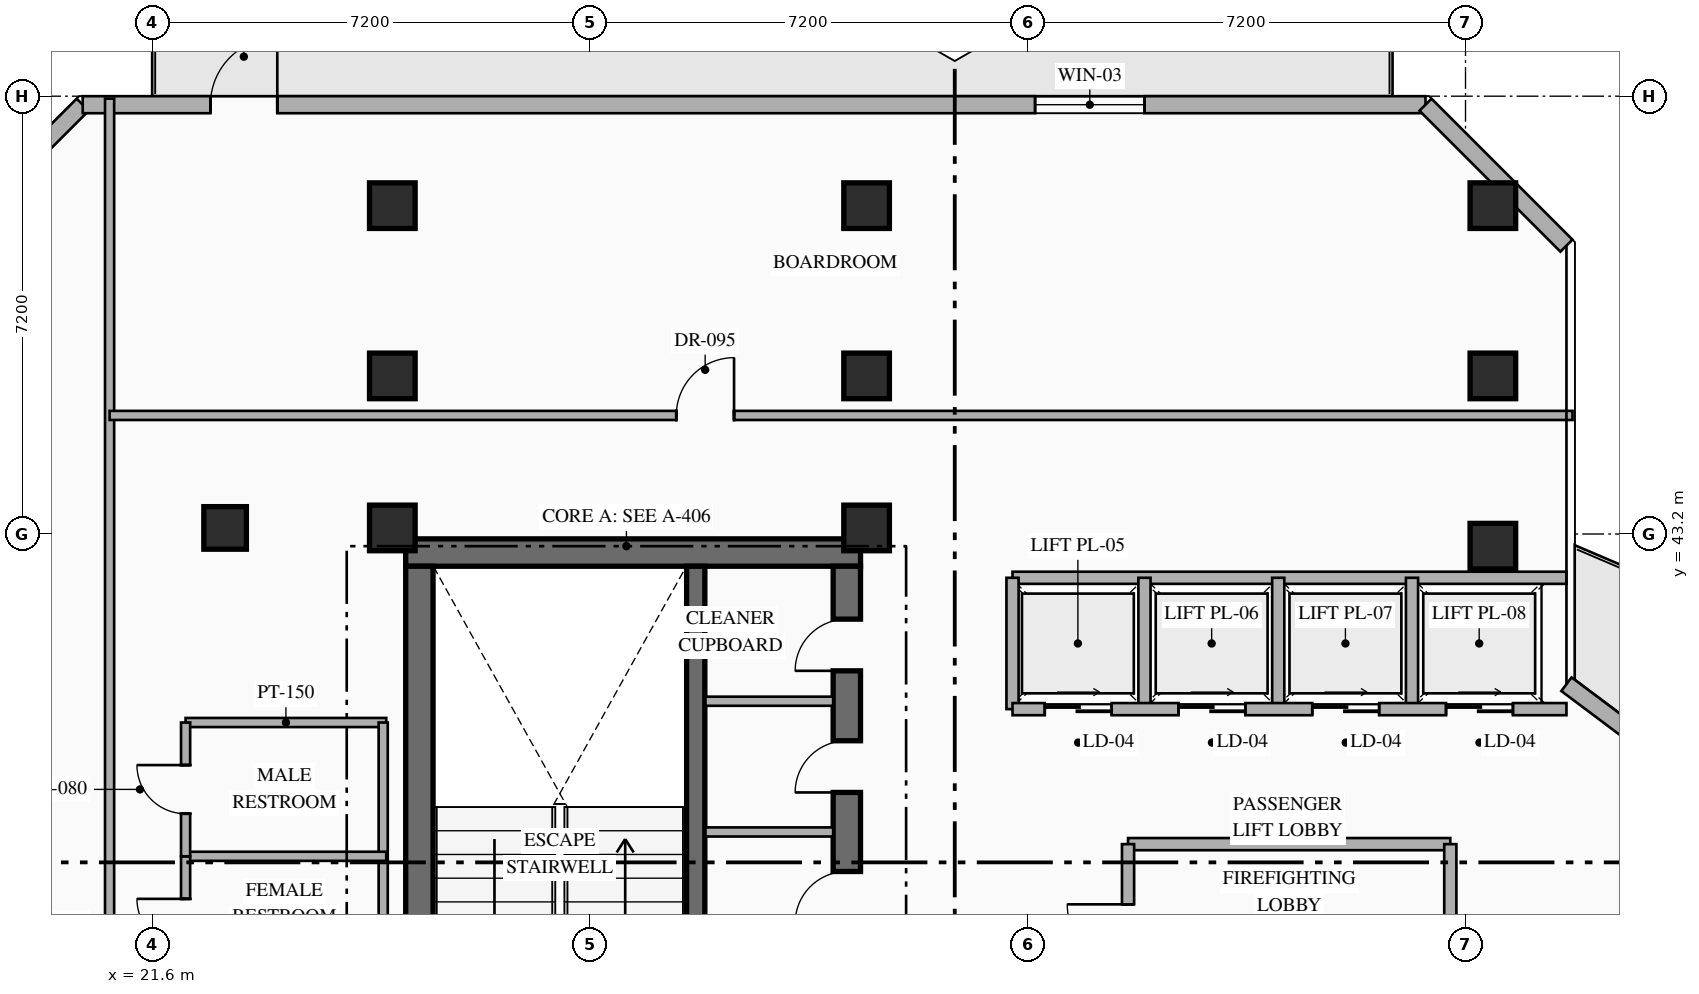
"""IFC4 building model, lengths in metres.
Left out: names, types, materials, properties, quantities, classifications, styles, units other than length and angle.
Written with IfcOpenShell. Run it as: python <this file> out.ifc"""

import sys

from ifc_helpers import new_model, si_unit, direction, frame, frame_2d, origin, origin_2d, place, context, subcontext, project, spatial, rectangle, hollow_rectangle, extrude, element, fill, save


model = new_model("IFC4")
c1 = context("Model", 3, precision=1e-05, world=origin(), true_north=direction((0.0, 1.0)))
c2 = subcontext(c1, "Body", "Model", "MODEL_VIEW")
j1 = project(units=[si_unit("LENGTHUNIT", "METRE"), si_unit("PLANEANGLEUNIT", "RADIAN")], contexts=[c1])
p1 = place(None, origin())
s1 = spatial("IfcSite", under=j1, at=p1, CompositionType="ELEMENT")
p2 = place(p1, origin())
s2 = spatial("IfcBuilding", under=s1, at=p2, CompositionType="ELEMENT")
p3 = place(p2, frame((0.0, 0.0, 205.95)))
s3 = spatial("IfcBuildingStorey", under=s2, at=p3, CompositionType="ELEMENT", Elevation=205.95)
p4 = place(p3, frame((25.77, 42.895, 0.0), z_axis=(0.0, 0.0, 1.0), x_axis=(1.0, 0.0, 0.0)))
e1 = element("IfcWall", 1, at=p4, inside=s3, PredefinedType="SHEAR", context=c2, shape_type="SweptSolid", body=[
    extrude(rectangle(XDim=7.48, YDim=0.45, at=frame_2d((3.74, 0.0))), origin(), (0.0, 0.0, 1.0), 3.6),
])
p5 = place(p3, frame((25.995, 33.19, 0.0), z_axis=(0.0, 0.0, 1.0), x_axis=(0.0, 1.0, 0.0)))
e2 = element("IfcWall", 2, at=p5, inside=s3, PredefinedType="SHEAR", context=c2, shape_type="SweptSolid", body=[
    extrude(rectangle(XDim=9.48, YDim=0.45, at=frame_2d((4.74, 0.0))), origin(), (0.0, 0.0, 1.0), 3.6),
])
p6 = place(p3, frame((33.025, 33.19, 0.0), z_axis=(0.0, 0.0, 1.0), x_axis=(0.0, 1.0, 0.0)))
e3 = element("IfcWall", 3, at=p6, inside=s3, PredefinedType="SHEAR", context=c2, shape_type="SweptSolid", body=[
    extrude(rectangle(XDim=9.48, YDim=0.45, at=frame_2d((4.74, 0.0))), origin(), (0.0, 0.0, 1.0), 3.6),
])
p7 = place(p6, frame((3.61, 0.0, 0.0)))
e4 = element("IfcOpeningElement", 4, at=p7, cuts=e3, PredefinedType="OPENING", context=c2, shape_type="SweptSolid", body=[
    extrude(rectangle(XDim=0.85, YDim=2.08, at=frame_2d((0.425, 1.04))), frame((0.0, 0.235, 0.0), z_axis=(0.0, -1.0, 0.0), x_axis=(1.0, 0.0, 0.0)), (0.0, 0.0, 1.0), 0.47),
])
p8 = place(p6, frame((5.76, 0.0, 0.0)))
e5 = element("IfcOpeningElement", 5, at=p8, cuts=e3, PredefinedType="OPENING", context=c2, shape_type="SweptSolid", body=[
    extrude(rectangle(XDim=0.85, YDim=2.08, at=frame_2d((0.425, 1.04))), frame((0.0, 0.235, 0.0), z_axis=(0.0, -1.0, 0.0), x_axis=(1.0, 0.0, 0.0)), (0.0, 0.0, 1.0), 0.47),
])
p9 = place(p6, frame((7.76, 0.0, 0.0)))
e6 = element("IfcOpeningElement", 6, at=p9, cuts=e3, PredefinedType="OPENING", context=c2, shape_type="SweptSolid", body=[
    extrude(rectangle(XDim=0.85, YDim=2.08, at=frame_2d((0.425, 1.04))), frame((0.0, 0.235, 0.0), z_axis=(0.0, -1.0, 0.0), x_axis=(1.0, 0.0, 0.0)), (0.0, 0.0, 1.0), 0.47),
])
p10 = place(p3, frame((30.54, 33.19, 0.0), z_axis=(0.0, 0.0, 1.0), x_axis=(0.0, 1.0, 0.0)))
e7 = element("IfcWall", 7, at=p10, inside=s3, PredefinedType="SHEAR", context=c2, shape_type="SweptSolid", body=[
    extrude(rectangle(XDim=9.48, YDim=0.3, at=frame_2d((4.74, 0.0))), origin(), (0.0, 0.0, 1.0), 3.6),
])
for number, where, z_axis, x_axis in (
    (8, (25.55, 43.3, 0.0), (0.0, 0.0, 1.0), (1.0, 0.0, 0.0)),
    (9, (33.35, 43.3, 0.0), (0.0, 0.0, 1.0), (1.0, 0.0, 0.0)),
    (10, (43.65, 43.0, 0.0), (0.0, 0.0, 1.0), (1.0, 0.0, 0.0)),
    (11, (25.55, 45.8, 0.0), (0.0, 0.0, 1.0), (1.0, 0.0, 0.0)),
    (12, (33.35, 45.8, 0.0), (0.0, 0.0, 1.0), (1.0, 0.0, 0.0)),
    (13, (43.65, 45.8, 0.0), (0.0, 0.0, 1.0), (1.0, 0.0, 0.0)),
    (14, (25.55, 48.6, 0.0), (0.0, 0.0, 1.0), (1.0, 0.0, 0.0)),
    (15, (33.35, 48.6, 0.0), (0.0, 0.0, 1.0), (1.0, 0.0, 0.0)),
    (16, (43.65, 48.6, 0.0), (0.0, 0.0, 1.0), (1.0, 0.0, 0.0)),
):
    element("IfcColumn", number, at=place(p3, frame(where, z_axis=z_axis, x_axis=x_axis)), inside=s3, PredefinedType="COLUMN", context=c2, shape_type="SweptSolid", body=[
        extrude(hollow_rectangle(XDim=0.75, YDim=0.75, WallThickness=0.028, at=origin_2d()), origin(), (0.0, 0.0, 1.0), 3.6),
    ])
p11 = place(p3, frame((22.8, 43.3, 0.0), z_axis=(0.0, 0.0, 1.0), x_axis=(1.0, 0.0, 0.0)))
e17 = element("IfcColumn", 17, at=p11, inside=s3, PredefinedType="COLUMN", context=c2, shape_type="SweptSolid", body=[
    extrude(hollow_rectangle(XDim=0.7, YDim=0.7, WallThickness=0.028, at=origin_2d()), origin(), (0.0, 0.0, 1.0), 3.6),
])
p12 = place(p3, frame((44.86, 40.73, 0.0), z_axis=(0.0, 0.0, 1.0), x_axis=(0.800007624502, -0.599989833863, 0.0)))
e18 = element("IfcWall", 18, at=p12, inside=s3, PredefinedType="STANDARD", context=c2, shape_type="SweptSolid", body=[
    extrude(rectangle(XDim=19.212, YDim=0.28, at=frame_2d((9.606, 0.0))), origin(), (0.0, 0.0, 1.0), 3.35),
])
p13 = place(p12, frame((1.755, 0.0, 0.0)))
e19 = element("IfcOpeningElement", 19, at=p13, cuts=e18, PredefinedType="OPENING", context=c2, shape_type="SweptSolid", body=[
    extrude(rectangle(XDim=1.1, YDim=2.2, at=frame_2d((0.55, 1.1))), frame((0.0, 0.15, 0.0), z_axis=(0.0, -1.0, 0.0), x_axis=(1.0, 0.0, 0.0)), (0.0, 0.0, 1.0), 0.3),
])
p14 = place(p12, frame((13.509, 0.0, 0.85)))
e20 = element("IfcOpeningElement", 20, at=p14, cuts=e18, PredefinedType="OPENING", context=c2, shape_type="SweptSolid", body=[
    extrude(rectangle(XDim=1.8, YDim=2.1, at=frame_2d((0.9, 1.05))), frame((0.0, 0.15, 0.0), z_axis=(0.0, -1.0, 0.0), x_axis=(1.0, 0.0, 0.0)), (0.0, 0.0, 1.0), 0.3),
])
p15 = place(p3, frame((18.14, 47.942, 0.0), z_axis=(0.0, 0.0, 1.0), x_axis=(0.707106781187, 0.707106781187, 0.0)))
e21 = element("IfcWall", 21, at=p15, inside=s3, PredefinedType="STANDARD", context=c2, shape_type="SweptSolid", body=[
    extrude(rectangle(XDim=3.278, YDim=0.28, at=frame_2d((1.639, 0.0))), origin(), (0.0, 0.0, 1.0), 3.35),
])
p16 = place(p3, frame((20.458, 50.26, 0.0), z_axis=(0.0, 0.0, 1.0), x_axis=(1.0, 0.0, 0.0)))
e22 = element("IfcWall", 22, at=p16, inside=s3, PredefinedType="STANDARD", context=c2, shape_type="SweptSolid", body=[
    extrude(rectangle(XDim=22.084, YDim=0.28, at=frame_2d((11.042, 0.0))), origin(), (0.0, 0.0, 1.0), 3.35),
])
p17 = place(p16, frame((2.1, 0.0, 0.0)))
e23 = element("IfcOpeningElement", 23, at=p17, cuts=e22, PredefinedType="OPENING", context=c2, shape_type="SweptSolid", body=[
    extrude(rectangle(XDim=1.1, YDim=2.2, at=frame_2d((0.55, 1.1))), frame((0.0, 0.15, 0.0), z_axis=(0.0, -1.0, 0.0), x_axis=(1.0, 0.0, 0.0)), (0.0, 0.0, 1.0), 0.3),
])
p18 = place(p16, frame((15.663, 0.0, 0.85)))
e24 = element("IfcOpeningElement", 24, at=p18, cuts=e22, PredefinedType="OPENING", context=c2, shape_type="SweptSolid", body=[
    extrude(rectangle(XDim=1.8, YDim=2.1, at=frame_2d((0.9, 1.05))), frame((0.0, 0.15, 0.0), z_axis=(0.0, -1.0, 0.0), x_axis=(1.0, 0.0, 0.0)), (0.0, 0.0, 1.0), 0.3),
])
p19 = place(p3, frame((42.542, 50.26, 0.0), z_axis=(0.0, 0.0, 1.0), x_axis=(0.707106781187, -0.707106781187, 0.0)))
e25 = element("IfcWall", 25, at=p19, inside=s3, PredefinedType="STANDARD", context=c2, shape_type="SweptSolid", body=[
    extrude(rectangle(XDim=3.278, YDim=0.28, at=frame_2d((1.639, 0.0))), origin(), (0.0, 0.0, 1.0), 3.35),
])
for number, where, z_axis, x_axis in (
    (26, (30.7, 38.3, 0.0), (0.0, 0.0, 1.0), (1.0, 0.0, 0.0)),
    (27, (30.7, 40.45, 0.0), (0.0, 0.0, 1.0), (1.0, 0.0, 0.0)),
):
    element("IfcWall", number, at=place(p3, frame(where, z_axis=z_axis, x_axis=x_axis)), inside=s3, PredefinedType="PARTITIONING", context=c2, shape_type="SweptSolid", body=[
        extrude(rectangle(XDim=2.1, YDim=0.15, at=frame_2d((1.05, 0.0))), origin(), (0.0, 0.0, 1.0), 3.35),
    ])
p20 = place(p3, frame((37.65, 38.1, 0.0), z_axis=(0.0, 0.0, 1.0), x_axis=(1.0, 0.0, 0.0)))
e28 = element("IfcWall", 28, at=p20, inside=s3, PredefinedType="STANDARD", context=c2, shape_type="SweptSolid", body=[
    extrude(rectangle(XDim=5.3, YDim=0.2, at=frame_2d((2.65, 0.0))), origin(), (0.0, 0.0, 1.0), 3.35),
])
p21 = place(p3, frame((42.95, 35.12, 0.0), z_axis=(0.0, 0.0, 1.0), x_axis=(0.0, 1.0, 0.0)))
e29 = element("IfcWall", 29, at=p21, inside=s3, PredefinedType="STANDARD", context=c2, shape_type="SweptSolid", body=[
    extrude(rectangle(XDim=2.98, YDim=0.2, at=frame_2d((1.49, 0.0))), origin(), (0.0, 0.0, 1.0), 3.35),
])
p22 = place(p3, frame((37.65, 35.12, 0.0), z_axis=(0.0, 0.0, 1.0), x_axis=(0.0, 1.0, 0.0)))
e30 = element("IfcWall", 30, at=p22, inside=s3, PredefinedType="STANDARD", context=c2, shape_type="SweptSolid", body=[
    extrude(rectangle(XDim=2.98, YDim=0.2, at=frame_2d((1.49, 0.0))), origin(), (0.0, 0.0, 1.0), 3.35),
])
p23 = place(p22, frame((0.99, 0.0, 0.0)))
e31 = element("IfcOpeningElement", 31, at=p23, cuts=e30, PredefinedType="OPENING", context=c2, shape_type="SweptSolid", body=[
    extrude(rectangle(XDim=1.0, YDim=2.2, at=frame_2d((0.5, 1.1))), frame((0.0, 0.11, 0.0), z_axis=(0.0, -1.0, 0.0), x_axis=(1.0, 0.0, 0.0)), (0.0, 0.0, 1.0), 0.22),
])
p24 = place(p3, frame((35.75, 42.48, 0.0), z_axis=(0.0, 0.0, 1.0), x_axis=(1.0, 0.0, 0.0)))
e32 = element("IfcWall", 32, at=p24, inside=s3, PredefinedType="STANDARD", context=c2, shape_type="SweptSolid", body=[
    extrude(rectangle(XDim=9.11, YDim=0.2, at=frame_2d((4.555, 0.0))), origin(), (0.0, 0.0, 1.0), 3.35),
])
for number, where, z_axis, x_axis in (
    (33, (35.75, 40.32, 0.0), (0.0, 0.0, 1.0), (0.0, 1.0, 0.0)),
    (34, (37.92, 40.32, 0.0), (0.0, 0.0, 1.0), (0.0, 1.0, 0.0)),
    (35, (40.12, 40.32, 0.0), (0.0, 0.0, 1.0), (0.0, 1.0, 0.0)),
    (36, (42.32, 40.32, 0.0), (0.0, 0.0, 1.0), (0.0, 1.0, 0.0)),
):
    element("IfcWall", number, at=place(p3, frame(where, z_axis=z_axis, x_axis=x_axis)), inside=s3, PredefinedType="STANDARD", context=c2, shape_type="SweptSolid", body=[
        extrude(rectangle(XDim=2.16, YDim=0.2, at=frame_2d((1.08, 0.0))), origin(), (0.0, 0.0, 1.0), 3.35),
    ])
p25 = place(p3, frame((35.75, 40.32, 0.0), z_axis=(0.0, 0.0, 1.0), x_axis=(1.0, 0.0, 0.0)))
e37 = element("IfcWall", 37, at=p25, inside=s3, PredefinedType="STANDARD", context=c2, shape_type="SweptSolid", body=[
    extrude(rectangle(XDim=9.11, YDim=0.2, at=frame_2d((4.555, 0.0))), origin(), (0.0, 0.0, 1.0), 3.35),
])
p26 = place(p25, frame((0.53, 0.0, 0.0)))
e38 = element("IfcOpeningElement", 38, at=p26, cuts=e37, PredefinedType="OPENING", context=c2, shape_type="SweptSolid", body=[
    extrude(rectangle(XDim=1.1, YDim=2.18, at=frame_2d((0.55, 1.09))), frame((0.0, 0.11, 0.0), z_axis=(0.0, -1.0, 0.0), x_axis=(1.0, 0.0, 0.0)), (0.0, 0.0, 1.0), 0.22),
])
p27 = place(p25, frame((2.73, 0.0, 0.0)))
e39 = element("IfcOpeningElement", 39, at=p27, cuts=e37, PredefinedType="OPENING", context=c2, shape_type="SweptSolid", body=[
    extrude(rectangle(XDim=1.1, YDim=2.18, at=frame_2d((0.55, 1.09))), frame((0.0, 0.11, 0.0), z_axis=(0.0, -1.0, 0.0), x_axis=(1.0, 0.0, 0.0)), (0.0, 0.0, 1.0), 0.22),
])
p28 = place(p25, frame((4.93, 0.0, 0.0)))
e40 = element("IfcOpeningElement", 40, at=p28, cuts=e37, PredefinedType="OPENING", context=c2, shape_type="SweptSolid", body=[
    extrude(rectangle(XDim=1.1, YDim=2.18, at=frame_2d((0.55, 1.09))), frame((0.0, 0.11, 0.0), z_axis=(0.0, -1.0, 0.0), x_axis=(1.0, 0.0, 0.0)), (0.0, 0.0, 1.0), 0.22),
])
p29 = place(p25, frame((7.13, 0.0, 0.0)))
e41 = element("IfcOpeningElement", 41, at=p29, cuts=e37, PredefinedType="OPENING", context=c2, shape_type="SweptSolid", body=[
    extrude(rectangle(XDim=1.1, YDim=2.18, at=frame_2d((0.55, 1.09))), frame((0.0, 0.11, 0.0), z_axis=(0.0, -1.0, 0.0), x_axis=(1.0, 0.0, 0.0)), (0.0, 0.0, 1.0), 0.22),
])
p30 = place(p3, frame((22.15, 40.1, 0.0), z_axis=(0.0, 0.0, 1.0), x_axis=(1.0, 0.0, 0.0)))
e42 = element("IfcWall", 42, at=p30, inside=s3, PredefinedType="PARTITIONING", context=c2, shape_type="SweptSolid", body=[
    extrude(rectangle(XDim=3.3, YDim=0.15, at=frame_2d((1.65, 0.0))), origin(), (0.0, 0.0, 1.0), 3.35),
])
p31 = place(p3, frame((25.4, 33.5, 0.0), z_axis=(0.0, 0.0, 1.0), x_axis=(0.0, 1.0, 0.0)))
e43 = element("IfcWall", 43, at=p31, inside=s3, PredefinedType="PARTITIONING", context=c2, shape_type="SweptSolid", body=[
    extrude(rectangle(XDim=6.6, YDim=0.15, at=frame_2d((3.3, 0.0))), origin(), (0.0, 0.0, 1.0), 3.35),
])
p32 = place(p3, frame((22.15, 37.9, 0.0), z_axis=(0.0, 0.0, 1.0), x_axis=(1.0, 0.0, 0.0)))
e44 = element("IfcWall", 44, at=p32, inside=s3, PredefinedType="PARTITIONING", context=c2, shape_type="SweptSolid", body=[
    extrude(rectangle(XDim=3.3, YDim=0.15, at=frame_2d((1.65, 0.0))), origin(), (0.0, 0.0, 1.0), 3.35),
])
p33 = place(p3, frame((22.15, 35.7, 0.0), z_axis=(0.0, 0.0, 1.0), x_axis=(0.0, 1.0, 0.0)))
e45 = element("IfcWall", 45, at=p33, inside=s3, PredefinedType="PARTITIONING", context=c2, shape_type="SweptSolid", body=[
    extrude(rectangle(XDim=2.2, YDim=0.15, at=frame_2d((1.1, 0.0))), origin(), (0.0, 0.0, 1.0), 3.35),
])
p34 = place(p33, frame((0.7, 0.0, 0.0)))
e46 = element("IfcOpeningElement", 46, at=p34, cuts=e45, PredefinedType="OPENING", context=c2, shape_type="SweptSolid", body=[
    extrude(rectangle(XDim=0.8, YDim=2.06, at=frame_2d((0.4, 1.03))), frame((0.0, 0.085, 0.0), z_axis=(0.0, -1.0, 0.0), x_axis=(1.0, 0.0, 0.0)), (0.0, 0.0, 1.0), 0.17),
])
p35 = place(p3, frame((22.15, 37.9, 0.0), z_axis=(0.0, 0.0, 1.0), x_axis=(0.0, 1.0, 0.0)))
e47 = element("IfcWall", 47, at=p35, inside=s3, PredefinedType="PARTITIONING", context=c2, shape_type="SweptSolid", body=[
    extrude(rectangle(XDim=2.2, YDim=0.15, at=frame_2d((1.1, 0.0))), origin(), (0.0, 0.0, 1.0), 3.35),
])
p36 = place(p35, frame((0.7, 0.0, 0.0)))
e48 = element("IfcOpeningElement", 48, at=p36, cuts=e47, PredefinedType="OPENING", context=c2, shape_type="SweptSolid", body=[
    extrude(rectangle(XDim=0.8, YDim=2.06, at=frame_2d((0.4, 1.03))), frame((0.0, 0.085, 0.0), z_axis=(0.0, -1.0, 0.0), x_axis=(1.0, 0.0, 0.0)), (0.0, 0.0, 1.0), 0.17),
])
p37 = place(p3, frame((20.9, 23.44, 0.0), z_axis=(0.0, 0.0, 1.0), x_axis=(0.0, 1.0, 0.0)))
e49 = element("IfcWall", 49, at=p37, inside=s3, PredefinedType="PARTITIONING", context=c2, shape_type="SweptSolid", body=[
    extrude(rectangle(XDim=26.92, YDim=0.15, at=frame_2d((13.46, 0.0))), origin(), (0.0, 0.0, 1.0), 3.35),
])
p38 = place(p37, frame((7.943, 0.0, 0.0)))
e50 = element("IfcOpeningElement", 50, at=p38, cuts=e49, PredefinedType="OPENING", context=c2, shape_type="SweptSolid", body=[
    extrude(rectangle(XDim=0.95, YDim=2.15, at=frame_2d((0.475, 1.075))), frame((0.0, 0.085, 0.0), z_axis=(0.0, -1.0, 0.0), x_axis=(1.0, 0.0, 0.0)), (0.0, 0.0, 1.0), 0.17),
])
p39 = place(p3, frame((20.9, 45.15, 0.0), z_axis=(0.0, 0.0, 1.0), x_axis=(1.0, 0.0, 0.0)))
e51 = element("IfcWall", 51, at=p39, inside=s3, PredefinedType="PARTITIONING", context=c2, shape_type="SweptSolid", body=[
    extrude(rectangle(XDim=24.06, YDim=0.15, at=frame_2d((12.03, 0.0))), origin(), (0.0, 0.0, 1.0), 3.35),
])
p40 = place(p39, frame((9.32, 0.0, 0.0)))
e52 = element("IfcOpeningElement", 52, at=p40, cuts=e51, PredefinedType="OPENING", context=c2, shape_type="SweptSolid", body=[
    extrude(rectangle(XDim=0.95, YDim=2.15, at=frame_2d((0.475, 1.075))), frame((0.0, 0.085, 0.0), z_axis=(0.0, -1.0, 0.0), x_axis=(1.0, 0.0, 0.0)), (0.0, 0.0, 1.0), 0.17),
])
p41 = place(p3, frame((43.48, 31.773, 0.0), z_axis=(0.0, 0.0, 1.0), x_axis=(0.599971041729, 0.800021717885, 0.0)))
e53 = element("IfcWall", 53, at=p41, inside=s3, PredefinedType="PARTITIONING", context=c2, shape_type="SweptSolid", body=[
    extrude(rectangle(XDim=8.094, YDim=0.15, at=frame_2d((4.047, 0.0))), origin(), (0.0, 0.0, 1.0), 3.35),
])
p42 = place(p17, origin())
e54 = element("IfcDoor", 54, at=p42, inside=s3, OperationType="SINGLE_SWING_RIGHT", PredefinedType="DOOR", context=c2, shape_type="SweptSolid", body=[
    extrude(rectangle(XDim=1.1, YDim=2.2, at=frame_2d((0.55, 1.1))), frame((0.0, 0.025, 0.0), z_axis=(0.0, -1.0, 0.0), x_axis=(1.0, 0.0, 0.0)), (0.0, 0.0, 1.0), 0.05),
])
fill(e23, e54)
p43 = place(p18, origin())
e55 = element("IfcWindow", 55, at=p43, inside=s3, PartitioningType="SINGLE_PANEL", PredefinedType="WINDOW", context=c2, shape_type="SweptSolid", body=[
    extrude(rectangle(XDim=1.8, YDim=2.1, at=frame_2d((0.9, 1.05))), frame((0.0, 0.03, 0.0), z_axis=(0.0, -1.0, 0.0), x_axis=(1.0, 0.0, 0.0)), (0.0, 0.0, 1.0), 0.06),
])
fill(e24, e55)
p44 = place(p7, origin())
e56 = element("IfcDoor", 56, at=p44, inside=s3, OperationType="SINGLE_SWING_LEFT", PredefinedType="DOOR", context=c2, shape_type="SweptSolid", body=[
    extrude(rectangle(XDim=0.85, YDim=2.08, at=frame_2d((0.425, 1.04))), frame((0.0, 0.025, 0.0), z_axis=(0.0, -1.0, 0.0), x_axis=(1.0, 0.0, 0.0)), (0.0, 0.0, 1.0), 0.05),
])
fill(e4, e56)
p45 = place(p8, origin())
e57 = element("IfcDoor", 57, at=p45, inside=s3, OperationType="SINGLE_SWING_LEFT", PredefinedType="DOOR", context=c2, shape_type="SweptSolid", body=[
    extrude(rectangle(XDim=0.85, YDim=2.08, at=frame_2d((0.425, 1.04))), frame((0.0, 0.025, 0.0), z_axis=(0.0, -1.0, 0.0), x_axis=(1.0, 0.0, 0.0)), (0.0, 0.0, 1.0), 0.05),
])
fill(e5, e57)
p46 = place(p9, origin())
e58 = element("IfcDoor", 58, at=p46, inside=s3, OperationType="SINGLE_SWING_LEFT", PredefinedType="DOOR", context=c2, shape_type="SweptSolid", body=[
    extrude(rectangle(XDim=0.85, YDim=2.08, at=frame_2d((0.425, 1.04))), frame((0.0, 0.025, 0.0), z_axis=(0.0, -1.0, 0.0), x_axis=(1.0, 0.0, 0.0)), (0.0, 0.0, 1.0), 0.05),
])
fill(e6, e58)
p47 = place(p23, origin())
e59 = element("IfcDoor", 59, at=p47, inside=s3, OperationType="SINGLE_SWING_RIGHT", PredefinedType="DOOR", context=c2, shape_type="SweptSolid", body=[
    extrude(rectangle(XDim=1.0, YDim=2.2, at=frame_2d((0.5, 1.1))), frame((0.0, 0.025, 0.0), z_axis=(0.0, -1.0, 0.0), x_axis=(1.0, 0.0, 0.0)), (0.0, 0.0, 1.0), 0.05),
])
fill(e31, e59)
p48 = place(p26, origin())
e60 = element("IfcDoor", 60, at=p48, inside=s3, OperationType="SLIDING_TO_RIGHT", PredefinedType="USERDEFINED", context=c2, shape_type="SweptSolid", body=[
    extrude(rectangle(XDim=1.1, YDim=2.18, at=frame_2d((0.55, 1.09))), frame((0.0, 0.025, 0.0), z_axis=(0.0, -1.0, 0.0), x_axis=(1.0, 0.0, 0.0)), (0.0, 0.0, 1.0), 0.05),
])
fill(e38, e60)
p49 = place(p27, origin())
e61 = element("IfcDoor", 61, at=p49, inside=s3, OperationType="SLIDING_TO_RIGHT", PredefinedType="USERDEFINED", context=c2, shape_type="SweptSolid", body=[
    extrude(rectangle(XDim=1.1, YDim=2.18, at=frame_2d((0.55, 1.09))), frame((0.0, 0.025, 0.0), z_axis=(0.0, -1.0, 0.0), x_axis=(1.0, 0.0, 0.0)), (0.0, 0.0, 1.0), 0.05),
])
fill(e39, e61)
p50 = place(p28, origin())
e62 = element("IfcDoor", 62, at=p50, inside=s3, OperationType="SLIDING_TO_RIGHT", PredefinedType="USERDEFINED", context=c2, shape_type="SweptSolid", body=[
    extrude(rectangle(XDim=1.1, YDim=2.18, at=frame_2d((0.55, 1.09))), frame((0.0, 0.025, 0.0), z_axis=(0.0, -1.0, 0.0), x_axis=(1.0, 0.0, 0.0)), (0.0, 0.0, 1.0), 0.05),
])
fill(e40, e62)
p51 = place(p29, origin())
e63 = element("IfcDoor", 63, at=p51, inside=s3, OperationType="SLIDING_TO_RIGHT", PredefinedType="USERDEFINED", context=c2, shape_type="SweptSolid", body=[
    extrude(rectangle(XDim=1.1, YDim=2.18, at=frame_2d((0.55, 1.09))), frame((0.0, 0.025, 0.0), z_axis=(0.0, -1.0, 0.0), x_axis=(1.0, 0.0, 0.0)), (0.0, 0.0, 1.0), 0.05),
])
fill(e41, e63)
p52 = place(p34, origin())
e64 = element("IfcDoor", 64, at=p52, inside=s3, OperationType="SINGLE_SWING_RIGHT", PredefinedType="DOOR", context=c2, shape_type="SweptSolid", body=[
    extrude(rectangle(XDim=0.8, YDim=2.06, at=frame_2d((0.4, 1.03))), frame((0.0, 0.025, 0.0), z_axis=(0.0, -1.0, 0.0), x_axis=(1.0, 0.0, 0.0)), (0.0, 0.0, 1.0), 0.05),
])
fill(e46, e64)
p53 = place(p36, origin())
e65 = element("IfcDoor", 65, at=p53, inside=s3, OperationType="SINGLE_SWING_RIGHT", PredefinedType="DOOR", context=c2, shape_type="SweptSolid", body=[
    extrude(rectangle(XDim=0.8, YDim=2.06, at=frame_2d((0.4, 1.03))), frame((0.0, 0.025, 0.0), z_axis=(0.0, -1.0, 0.0), x_axis=(1.0, 0.0, 0.0)), (0.0, 0.0, 1.0), 0.05),
])
fill(e48, e65)
p54 = place(p40, origin())
e66 = element("IfcDoor", 66, at=p54, inside=s3, OperationType="SINGLE_SWING_RIGHT", PredefinedType="DOOR", context=c2, shape_type="SweptSolid", body=[
    extrude(rectangle(XDim=0.95, YDim=2.15, at=frame_2d((0.475, 1.075))), frame((0.0, 0.025, 0.0), z_axis=(0.0, -1.0, 0.0), x_axis=(1.0, 0.0, 0.0)), (0.0, 0.0, 1.0), 0.05),
])
fill(e52, e66)
save(model, sys.argv[1])
